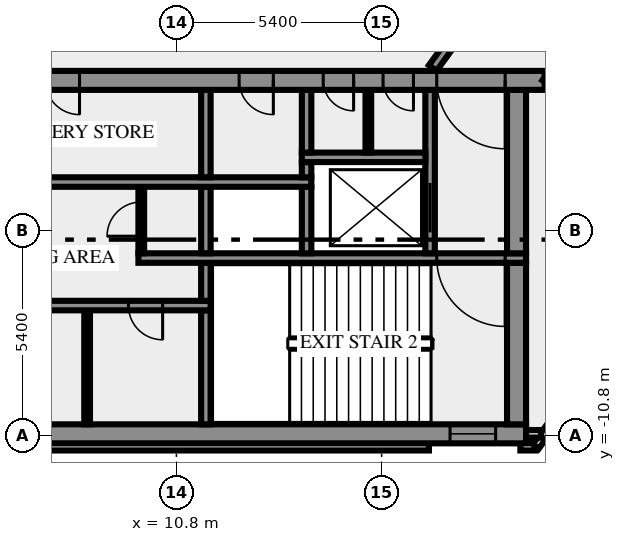
"""IFC4 building model, lengths in metres.
Left out: names, types, materials, properties, quantities, classifications, styles, units other than length and angle.
Written with IfcOpenShell. Run it as: python <this file> out.ifc"""

import sys

from ifc_helpers import new_model, si_unit, direction, frame, frame_2d, origin, place, context, subcontext, project, spatial, rectangle, extrude, element, fill, save


model = new_model("IFC4")
c1 = context("Model", 3, precision=1e-05, world=origin(), true_north=direction((0.0, 1.0)))
c2 = subcontext(c1, "Body", "Model", "MODEL_VIEW")
j1 = project(units=[si_unit("LENGTHUNIT", "METRE"), si_unit("PLANEANGLEUNIT", "RADIAN")], contexts=[c1])
p1 = place(None, origin())
s1 = spatial("IfcSite", under=j1, at=p1, CompositionType="ELEMENT")
p2 = place(p1, origin())
s2 = spatial("IfcBuilding", under=s1, at=p2, CompositionType="ELEMENT")
p3 = place(p2, frame((0.0, 0.0, 307.0)))
s3 = spatial("IfcBuildingStorey", under=s2, at=p3, CompositionType="ELEMENT", Elevation=307.0)
p4 = place(p3, frame((-17.444, -11.088, 0.0), z_axis=(0.0, 0.0, 1.0), x_axis=(1.0, 0.0, 0.0)))
e1 = element("IfcWall", 1, at=p4, inside=s3, PredefinedType="SOLIDWALL", context=c2, shape_type="SweptSolid", body=[
    extrude(rectangle(XDim=34.888, YDim=0.2, at=frame_2d((17.444, 0.0))), origin(), (0.0, 0.0, 1.0), 3.65),
])
p5 = place(p3, frame((19.85, -11.088, 0.0), z_axis=(0.0, 0.0, 1.0), x_axis=(1.0, 0.0, 0.0)))
e2 = element("IfcWall", 2, at=p5, inside=s3, PredefinedType="SOLIDWALL", context=c2, shape_type="SweptSolid", body=[
    extrude(rectangle(XDim=0.406, YDim=0.2, at=frame_2d((0.203, 0.0))), origin(), (0.0, 0.0, 1.0), 3.65),
])
p6 = place(p3, frame((20.253, -11.083, 0.0), z_axis=(0.0, 0.0, 1.0), x_axis=(0.587766567315, 0.809030569476, 0.0)))
e3 = element("IfcWall", 3, at=p6, inside=s3, PredefinedType="SOLIDWALL", context=c2, shape_type="SweptSolid", body=[
    extrude(rectangle(XDim=2.688, YDim=0.2, at=frame_2d((1.344, 0.0))), origin(), (0.0, 0.0, 1.0), 3.65),
])
p7 = place(p3, frame((19.98, -10.75, 0.0), z_axis=(0.0, 0.0, 1.0), x_axis=(1.0, 0.0, 0.0)))
e4 = element("IfcWall", 4, at=p7, inside=s3, PredefinedType="SOLIDWALL", context=c2, shape_type="SweptSolid", body=[
    extrude(rectangle(XDim=0.417, YDim=0.2, at=frame_2d((0.208, 0.0))), origin(), (0.0, 0.0, 1.0), 3.65),
])
p8 = place(p3, frame((-20.0, -10.75, 0.0), z_axis=(0.0, 0.0, 1.0), x_axis=(1.0, 0.0, 0.0)))
e5 = element("IfcWall", 5, at=p8, inside=s3, PredefinedType="SHEAR", context=c2, shape_type="SweptSolid", body=[
    extrude(rectangle(XDim=40.0, YDim=0.5, at=frame_2d((20.0, 0.0))), origin(), (0.0, 0.0, 1.0), 3.65),
])
p9 = place(p8, frame((0.8, 0.0, 1.0)))
e6 = element("IfcOpeningElement", 6, at=p9, cuts=e5, PredefinedType="OPENING", context=c2, shape_type="SweptSolid", body=[
    extrude(rectangle(XDim=1.2, YDim=1.2, at=frame_2d((0.6, 0.6))), frame((0.0, 0.26, 0.0), z_axis=(0.0, -1.0, 0.0), x_axis=(1.0, 0.0, 0.0)), (0.0, 0.0, 1.0), 0.52),
])
p10 = place(p8, frame((38.0, 0.0, 1.0)))
e7 = element("IfcOpeningElement", 7, at=p10, cuts=e5, PredefinedType="OPENING", context=c2, shape_type="SweptSolid", body=[
    extrude(rectangle(XDim=1.2, YDim=1.2, at=frame_2d((0.6, 0.6))), frame((0.0, 0.26, 0.0), z_axis=(0.0, -1.0, 0.0), x_axis=(1.0, 0.0, 0.0)), (0.0, 0.0, 1.0), 0.52),
])
p11 = place(p3, frame((8.45, -10.5, 0.0), z_axis=(0.0, 0.0, 1.0), x_axis=(0.0, 1.0, 0.0)))
e8 = element("IfcWall", 8, at=p11, inside=s3, PredefinedType="PARTITIONING", context=c2, shape_type="SweptSolid", body=[
    extrude(rectangle(XDim=3.0, YDim=0.15, at=frame_2d((1.5, 0.0))), origin(), (0.0, 0.0, 1.0), 3.65),
])
p12 = place(p3, frame((11.575, -10.5, 0.0), z_axis=(0.0, 0.0, 1.0), x_axis=(0.0, 1.0, 0.0)))
e9 = element("IfcWall", 9, at=p12, inside=s3, PredefinedType="SHEAR", context=c2, shape_type="SweptSolid", body=[
    extrude(rectangle(XDim=3.0, YDim=0.25, at=frame_2d((1.5, 0.0))), origin(), (0.0, 0.0, 1.0), 3.65),
])
p13 = place(p3, frame((19.75, -10.5, 0.0), z_axis=(0.0, 0.0, 1.0), x_axis=(0.0, 1.0, 0.0)))
e10 = element("IfcWall", 10, at=p13, inside=s3, PredefinedType="SHEAR", context=c2, shape_type="SweptSolid", body=[
    extrude(rectangle(XDim=4.25, YDim=0.5, at=frame_2d((2.125, 0.0))), origin(), (0.0, 0.0, 1.0), 3.65),
])
p14 = place(p3, frame((11.7, -7.375, 0.0), z_axis=(0.0, 0.0, 1.0), x_axis=(-1.0, 0.0, 0.0)))
e11 = element("IfcWall", 11, at=p14, inside=s3, PredefinedType="SHEAR", context=c2, shape_type="SweptSolid", body=[
    extrude(rectangle(XDim=23.4, YDim=0.25, at=frame_2d((11.7, 0.0))), origin(), (0.0, 0.0, 1.0), 3.65),
])
p15 = place(p14, frame((22.225, 0.0, 0.0)))
e12 = element("IfcOpeningElement", 12, at=p15, cuts=e11, PredefinedType="OPENING", context=c2, shape_type="SweptSolid", body=[
    extrude(rectangle(XDim=0.8, YDim=2.1, at=frame_2d((0.4, 1.05))), frame((0.0, 0.135, 0.0), z_axis=(0.0, -1.0, 0.0), x_axis=(1.0, 0.0, 0.0)), (0.0, 0.0, 1.0), 0.27),
])
p16 = place(p14, frame((20.2, 0.0, 0.0)))
e13 = element("IfcOpeningElement", 13, at=p16, cuts=e11, PredefinedType="OPENING", context=c2, shape_type="SweptSolid", body=[
    extrude(rectangle(XDim=1.1, YDim=2.1, at=frame_2d((0.55, 1.05))), frame((0.0, 0.135, 0.0), z_axis=(0.0, -1.0, 0.0), x_axis=(1.0, 0.0, 0.0)), (0.0, 0.0, 1.0), 0.27),
])
p17 = place(p14, frame((17.7, 0.0, 0.0)))
e14 = element("IfcOpeningElement", 14, at=p17, cuts=e11, PredefinedType="OPENING", context=c2, shape_type="SweptSolid", body=[
    extrude(rectangle(XDim=1.1, YDim=2.1, at=frame_2d((0.55, 1.05))), frame((0.0, 0.135, 0.0), z_axis=(0.0, -1.0, 0.0), x_axis=(1.0, 0.0, 0.0)), (0.0, 0.0, 1.0), 0.27),
])
p18 = place(p14, frame((15.975, 0.0, 0.0)))
e15 = element("IfcOpeningElement", 15, at=p18, cuts=e11, PredefinedType="OPENING", context=c2, shape_type="SweptSolid", body=[
    extrude(rectangle(XDim=0.8, YDim=2.1, at=frame_2d((0.4, 1.05))), frame((0.0, 0.135, 0.0), z_axis=(0.0, -1.0, 0.0), x_axis=(1.0, 0.0, 0.0)), (0.0, 0.0, 1.0), 0.27),
])
p19 = place(p14, frame((14.65, 0.0, 0.0)))
e16 = element("IfcOpeningElement", 16, at=p19, cuts=e11, PredefinedType="OPENING", context=c2, shape_type="SweptSolid", body=[
    extrude(rectangle(XDim=0.8, YDim=2.1, at=frame_2d((0.4, 1.05))), frame((0.0, 0.135, 0.0), z_axis=(0.0, -1.0, 0.0), x_axis=(1.0, 0.0, 0.0)), (0.0, 0.0, 1.0), 0.27),
])
p20 = place(p14, frame((12.8, 0.0, 0.0)))
e17 = element("IfcOpeningElement", 17, at=p20, cuts=e11, PredefinedType="OPENING", context=c2, shape_type="SweptSolid", body=[
    extrude(rectangle(XDim=0.9, YDim=2.1, at=frame_2d((0.45, 1.05))), frame((0.0, 0.135, 0.0), z_axis=(0.0, -1.0, 0.0), x_axis=(1.0, 0.0, 0.0)), (0.0, 0.0, 1.0), 0.27),
])
p21 = place(p14, frame((10.7, 0.0, 0.0)))
e18 = element("IfcOpeningElement", 18, at=p21, cuts=e11, PredefinedType="OPENING", context=c2, shape_type="SweptSolid", body=[
    extrude(rectangle(XDim=0.9, YDim=2.1, at=frame_2d((0.45, 1.05))), frame((0.0, 0.135, 0.0), z_axis=(0.0, -1.0, 0.0), x_axis=(1.0, 0.0, 0.0)), (0.0, 0.0, 1.0), 0.27),
])
p22 = place(p14, frame((6.237, 0.0, 0.0)))
e19 = element("IfcOpeningElement", 19, at=p22, cuts=e11, PredefinedType="OPENING", context=c2, shape_type="SweptSolid", body=[
    extrude(rectangle(XDim=0.9, YDim=2.1, at=frame_2d((0.45, 1.05))), frame((0.0, 0.135, 0.0), z_axis=(0.0, -1.0, 0.0), x_axis=(1.0, 0.0, 0.0)), (0.0, 0.0, 1.0), 0.27),
])
p23 = place(p14, frame((1.263, 0.0, 0.0)))
e20 = element("IfcOpeningElement", 20, at=p23, cuts=e11, PredefinedType="OPENING", context=c2, shape_type="SweptSolid", body=[
    extrude(rectangle(XDim=0.9, YDim=2.1, at=frame_2d((0.45, 1.05))), frame((0.0, 0.135, 0.0), z_axis=(0.0, -1.0, 0.0), x_axis=(1.0, 0.0, 0.0)), (0.0, 0.0, 1.0), 0.27),
])
p24 = place(p3, frame((11.575, -7.25, 0.0), z_axis=(0.0, 0.0, 1.0), x_axis=(0.0, 1.0, 0.0)))
e21 = element("IfcWall", 21, at=p24, inside=s3, PredefinedType="SHEAR", context=c2, shape_type="SweptSolid", body=[
    extrude(rectangle(XDim=1.0, YDim=0.25, at=frame_2d((0.5, 0.0))), origin(), (0.0, 0.0, 1.0), 3.65),
])
p25 = place(p3, frame((20.0, -6.125, 0.0), z_axis=(0.0, 0.0, 1.0), x_axis=(-1.0, 0.0, 0.0)))
e22 = element("IfcWall", 22, at=p25, inside=s3, PredefinedType="SHEAR", context=c2, shape_type="SweptSolid", body=[
    extrude(rectangle(XDim=10.2, YDim=0.25, at=frame_2d((5.1, 0.0))), origin(), (0.0, 0.0, 1.0), 3.65),
])
p26 = place(p25, frame((0.55, 0.0, 0.0)))
e23 = element("IfcOpeningElement", 23, at=p26, cuts=e22, PredefinedType="OPENING", context=c2, shape_type="SweptSolid", body=[
    extrude(rectangle(XDim=1.8, YDim=2.1, at=frame_2d((0.9, 1.05))), frame((0.0, 0.135, 0.0), z_axis=(0.0, -1.0, 0.0), x_axis=(1.0, 0.0, 0.0)), (0.0, 0.0, 1.0), 0.27),
])
p27 = place(p3, frame((9.875, -6.0, 0.0), z_axis=(0.0, 0.0, 1.0), x_axis=(0.0, 1.0, 0.0)))
e24 = element("IfcWall", 24, at=p27, inside=s3, PredefinedType="PARTITIONING", context=c2, shape_type="SweptSolid", body=[
    extrude(rectangle(XDim=1.75, YDim=0.15, at=frame_2d((0.875, 0.0))), origin(), (0.0, 0.0, 1.0), 3.65),
])
p28 = place(p27, frame((0.45, 0.0, 0.0)))
e25 = element("IfcOpeningElement", 25, at=p28, cuts=e24, PredefinedType="OPENING", context=c2, shape_type="SweptSolid", body=[
    extrude(rectangle(XDim=0.9, YDim=2.1, at=frame_2d((0.45, 1.05))), frame((0.0, 0.085, 0.0), z_axis=(0.0, -1.0, 0.0), x_axis=(1.0, 0.0, 0.0)), (0.0, 0.0, 1.0), 0.17),
])
for number, where, z_axis, x_axis in (
    (26, (11.575, -6.0, 0.0), (0.0, 0.0, 1.0), (0.0, 1.0, 0.0)),
    (27, (14.225, -6.0, 0.0), (0.0, 0.0, 1.0), (0.0, 1.0, 0.0)),
):
    element("IfcWall", number, at=place(p3, frame(where, z_axis=z_axis, x_axis=x_axis)), inside=s3, PredefinedType="SHEAR", context=c2, shape_type="SweptSolid", body=[
        extrude(rectangle(XDim=1.75, YDim=0.25, at=frame_2d((0.875, 0.0))), origin(), (0.0, 0.0, 1.0), 3.65),
    ])
p29 = place(p3, frame((17.475, -6.0, 0.0), z_axis=(0.0, 0.0, 1.0), x_axis=(0.0, 1.0, 0.0)))
e28 = element("IfcWall", 28, at=p29, inside=s3, PredefinedType="SHEAR", context=c2, shape_type="SweptSolid", body=[
    extrude(rectangle(XDim=4.3, YDim=0.25, at=frame_2d((2.15, 0.0))), origin(), (0.0, 0.0, 1.0), 3.65),
])
p30 = place(p29, frame((0.55, 0.0, 0.0)))
e29 = element("IfcOpeningElement", 29, at=p30, cuts=e28, PredefinedType="OPENING", context=c2, shape_type="SweptSolid", body=[
    extrude(rectangle(XDim=1.3, YDim=2.1, at=frame_2d((0.65, 1.05))), frame((0.0, 0.135, 0.0), z_axis=(0.0, -1.0, 0.0), x_axis=(1.0, 0.0, 0.0)), (0.0, 0.0, 1.0), 0.27),
])
p31 = place(p3, frame((19.75, -6.0, 0.0), z_axis=(0.0, 0.0, 1.0), x_axis=(0.0, 1.0, 0.0)))
e30 = element("IfcWall", 30, at=p31, inside=s3, PredefinedType="SHEAR", context=c2, shape_type="SweptSolid", body=[
    extrude(rectangle(XDim=4.3, YDim=0.5, at=frame_2d((2.15, 0.0))), origin(), (0.0, 0.0, 1.0), 3.65),
])
p32 = place(p3, frame((-0.6, -4.125, 0.0), z_axis=(0.0, 0.0, 1.0), x_axis=(1.0, 0.0, 0.0)))
e31 = element("IfcWall", 31, at=p32, inside=s3, PredefinedType="SHEAR", context=c2, shape_type="SweptSolid", body=[
    extrude(rectangle(XDim=14.95, YDim=0.25, at=frame_2d((7.475, 0.0))), origin(), (0.0, 0.0, 1.0), 3.65),
])
p33 = place(p32, frame((2.75, 0.0, 0.0)))
e32 = element("IfcOpeningElement", 32, at=p33, cuts=e31, PredefinedType="OPENING", context=c2, shape_type="SweptSolid", body=[
    extrude(rectangle(XDim=1.3, YDim=2.1, at=frame_2d((0.65, 1.05))), frame((0.0, 0.135, 0.0), z_axis=(0.0, -1.0, 0.0), x_axis=(1.0, 0.0, 0.0)), (0.0, 0.0, 1.0), 0.27),
])
p34 = place(p3, frame((11.575, -4.0, 0.0), z_axis=(0.0, 0.0, 1.0), x_axis=(0.0, 1.0, 0.0)))
e33 = element("IfcWall", 33, at=p34, inside=s3, PredefinedType="SHEAR", context=c2, shape_type="SweptSolid", body=[
    extrude(rectangle(XDim=2.3, YDim=0.25, at=frame_2d((1.15, 0.0))), origin(), (0.0, 0.0, 1.0), 3.65),
])
p35 = place(p3, frame((14.225, -4.0, 0.0), z_axis=(0.0, 0.0, 1.0), x_axis=(0.0, 1.0, 0.0)))
e34 = element("IfcWall", 34, at=p35, inside=s3, PredefinedType="SHEAR", context=c2, shape_type="SweptSolid", body=[
    extrude(rectangle(XDim=0.4, YDim=0.25, at=frame_2d((0.2, 0.0))), origin(), (0.0, 0.0, 1.0), 3.65),
])
p36 = place(p3, frame((14.1, -3.475, 0.0), z_axis=(0.0, 0.0, 1.0), x_axis=(1.0, 0.0, 0.0)))
e35 = element("IfcWall", 35, at=p36, inside=s3, PredefinedType="SHEAR", context=c2, shape_type="SweptSolid", body=[
    extrude(rectangle(XDim=3.25, YDim=0.25, at=frame_2d((1.625, 0.0))), origin(), (0.0, 0.0, 1.0), 3.65),
])
p37 = place(p3, frame((14.225, -3.35, 0.0), z_axis=(0.0, 0.0, 1.0), x_axis=(0.0, 1.0, 0.0)))
e36 = element("IfcWall", 36, at=p37, inside=s3, PredefinedType="SHEAR", context=c2, shape_type="SweptSolid", body=[
    extrude(rectangle(XDim=1.65, YDim=0.25, at=frame_2d((0.825, 0.0))), origin(), (0.0, 0.0, 1.0), 3.65),
])
p38 = place(p3, frame((15.85, -3.35, 0.0), z_axis=(0.0, 0.0, 1.0), x_axis=(0.0, 1.0, 0.0)))
e37 = element("IfcWall", 37, at=p38, inside=s3, PredefinedType="PARTITIONING", context=c2, shape_type="SweptSolid", body=[
    extrude(rectangle(XDim=1.65, YDim=0.15, at=frame_2d((0.825, 0.0))), origin(), (0.0, 0.0, 1.0), 3.65),
])
p39 = place(p3, frame((20.49, -1.45, 0.0), z_axis=(0.0, 0.0, 1.0), x_axis=(-1.0, 0.0, 0.0)))
e38 = element("IfcWall", 38, at=p39, inside=s3, PredefinedType="SHEAR", context=c2, shape_type="SweptSolid", body=[
    extrude(rectangle(XDim=40.98, YDim=0.5, at=frame_2d((20.49, 0.0))), origin(), (0.0, 0.0, 1.0), 3.65),
])
p40 = place(p39, frame((38.14, 0.0, 0.0)))
e39 = element("IfcOpeningElement", 39, at=p40, cuts=e38, PredefinedType="OPENING", context=c2, shape_type="SweptSolid", body=[
    extrude(rectangle(XDim=1.8, YDim=2.1, at=frame_2d((0.9, 1.05))), frame((0.0, 0.26, 0.0), z_axis=(0.0, -1.0, 0.0), x_axis=(1.0, 0.0, 0.0)), (0.0, 0.0, 1.0), 0.52),
])
p41 = place(p39, frame((35.89, 0.0, 0.0)))
e40 = element("IfcOpeningElement", 40, at=p41, cuts=e38, PredefinedType="OPENING", context=c2, shape_type="SweptSolid", body=[
    extrude(rectangle(XDim=0.9, YDim=2.1, at=frame_2d((0.45, 1.05))), frame((0.0, 0.26, 0.0), z_axis=(0.0, -1.0, 0.0), x_axis=(1.0, 0.0, 0.0)), (0.0, 0.0, 1.0), 0.52),
])
p42 = place(p39, frame((32.94, 0.0, 0.0)))
e41 = element("IfcOpeningElement", 41, at=p42, cuts=e38, PredefinedType="OPENING", context=c2, shape_type="SweptSolid", body=[
    extrude(rectangle(XDim=0.9, YDim=2.1, at=frame_2d((0.45, 1.05))), frame((0.0, 0.26, 0.0), z_axis=(0.0, -1.0, 0.0), x_axis=(1.0, 0.0, 0.0)), (0.0, 0.0, 1.0), 0.52),
])
p43 = place(p39, frame((31.015, 0.0, 0.0)))
e42 = element("IfcOpeningElement", 42, at=p43, cuts=e38, PredefinedType="OPENING", context=c2, shape_type="SweptSolid", body=[
    extrude(rectangle(XDim=0.8, YDim=2.1, at=frame_2d((0.4, 1.05))), frame((0.0, 0.26, 0.0), z_axis=(0.0, -1.0, 0.0), x_axis=(1.0, 0.0, 0.0)), (0.0, 0.0, 1.0), 0.52),
])
p44 = place(p39, frame((24.765, 0.0, 0.0)))
e43 = element("IfcOpeningElement", 43, at=p44, cuts=e38, PredefinedType="OPENING", context=c2, shape_type="SweptSolid", body=[
    extrude(rectangle(XDim=0.8, YDim=2.1, at=frame_2d((0.4, 1.05))), frame((0.0, 0.26, 0.0), z_axis=(0.0, -1.0, 0.0), x_axis=(1.0, 0.0, 0.0)), (0.0, 0.0, 1.0), 0.52),
])
p45 = place(p39, frame((21.765, 0.0, 0.0)))
e44 = element("IfcOpeningElement", 44, at=p45, cuts=e38, PredefinedType="OPENING", context=c2, shape_type="SweptSolid", body=[
    extrude(rectangle(XDim=2.0, YDim=2.1, at=frame_2d((1.0, 1.05))), frame((0.0, 0.26, 0.0), z_axis=(0.0, -1.0, 0.0), x_axis=(1.0, 0.0, 0.0)), (0.0, 0.0, 1.0), 0.52),
])
p46 = place(p39, frame((12.24, 0.0, 0.0)))
e45 = element("IfcOpeningElement", 45, at=p46, cuts=e38, PredefinedType="OPENING", context=c2, shape_type="SweptSolid", body=[
    extrude(rectangle(XDim=0.9, YDim=2.1, at=frame_2d((0.45, 1.05))), frame((0.0, 0.26, 0.0), z_axis=(0.0, -1.0, 0.0), x_axis=(1.0, 0.0, 0.0)), (0.0, 0.0, 1.0), 0.52),
])
p47 = place(p39, frame((7.14, 0.0, 0.0)))
e46 = element("IfcOpeningElement", 46, at=p47, cuts=e38, PredefinedType="OPENING", context=c2, shape_type="SweptSolid", body=[
    extrude(rectangle(XDim=0.9, YDim=2.1, at=frame_2d((0.45, 1.05))), frame((0.0, 0.26, 0.0), z_axis=(0.0, -1.0, 0.0), x_axis=(1.0, 0.0, 0.0)), (0.0, 0.0, 1.0), 0.52),
])
p48 = place(p39, frame((5.028, 0.0, 0.0)))
e47 = element("IfcOpeningElement", 47, at=p48, cuts=e38, PredefinedType="OPENING", context=c2, shape_type="SweptSolid", body=[
    extrude(rectangle(XDim=0.8, YDim=2.1, at=frame_2d((0.4, 1.05))), frame((0.0, 0.26, 0.0), z_axis=(0.0, -1.0, 0.0), x_axis=(1.0, 0.0, 0.0)), (0.0, 0.0, 1.0), 0.52),
])
p49 = place(p39, frame((3.452, 0.0, 0.0)))
e48 = element("IfcOpeningElement", 48, at=p49, cuts=e38, PredefinedType="OPENING", context=c2, shape_type="SweptSolid", body=[
    extrude(rectangle(XDim=0.8, YDim=2.1, at=frame_2d((0.4, 1.05))), frame((0.0, 0.26, 0.0), z_axis=(0.0, -1.0, 0.0), x_axis=(1.0, 0.0, 0.0)), (0.0, 0.0, 1.0), 0.52),
])
p50 = place(p39, frame((1.04, 0.0, 0.0)))
e49 = element("IfcOpeningElement", 49, at=p50, cuts=e38, PredefinedType="OPENING", context=c2, shape_type="SweptSolid", body=[
    extrude(rectangle(XDim=1.8, YDim=2.1, at=frame_2d((0.9, 1.05))), frame((0.0, 0.26, 0.0), z_axis=(0.0, -1.0, 0.0), x_axis=(1.0, 0.0, 0.0)), (0.0, 0.0, 1.0), 0.52),
])
p51 = place(p3, frame((17.545, -1.125, 0.0), z_axis=(0.0, 0.0, 1.0), x_axis=(0.587796810203, 0.809008596935, 0.0)))
e50 = element("IfcWall", 50, at=p51, inside=s3, PredefinedType="SOLIDWALL", context=c2, shape_type="SweptSolid", body=[
    extrude(rectangle(XDim=12.703, YDim=0.25, at=frame_2d((6.352, 0.0))), origin(), (0.0, 0.0, 1.0), 3.65),
])
p52 = place(p51, frame((11.329, 0.0, 0.0)))
e51 = element("IfcOpeningElement", 51, at=p52, cuts=e50, PredefinedType="OPENING", context=c2, shape_type="SweptSolid", body=[
    extrude(rectangle(XDim=0.9, YDim=2.1, at=frame_2d((0.45, 1.05))), frame((0.0, 0.135, 0.0), z_axis=(0.0, -1.0, 0.0), x_axis=(1.0, 0.0, 0.0)), (0.0, 0.0, 1.0), 0.27),
])
p53 = place(p3, frame((27.009, 7.392, 0.0), z_axis=(0.0, 0.0, 1.0), x_axis=(-0.587776457057, -0.809023384414, 0.0)))
e52 = element("IfcWall", 52, at=p53, inside=s3, PredefinedType="SOLIDWALL", context=c2, shape_type="SweptSolid", body=[
    extrude(rectangle(XDim=11.021, YDim=0.25, at=frame_2d((5.51, 0.0))), origin(), (0.0, 0.0, 1.0), 3.65),
])
p54 = place(p53, frame((9.588, 0.0, 0.0)))
e53 = element("IfcOpeningElement", 53, at=p54, cuts=e52, PredefinedType="OPENING", context=c2, shape_type="SweptSolid", body=[
    extrude(rectangle(XDim=0.9, YDim=2.1, at=frame_2d((0.45, 1.05))), frame((0.0, 0.135, 0.0), z_axis=(0.0, -1.0, 0.0), x_axis=(1.0, 0.0, 0.0)), (0.0, 0.0, 1.0), 0.27),
])
p55 = place(p10, origin())
e54 = element("IfcWindow", 54, at=p55, inside=s3, PartitioningType="SINGLE_PANEL", PredefinedType="WINDOW", context=c2, shape_type="SweptSolid", body=[
    extrude(rectangle(XDim=1.2, YDim=1.2, at=frame_2d((0.6, 0.6))), frame((0.0, 0.03, 0.0), z_axis=(0.0, -1.0, 0.0), x_axis=(1.0, 0.0, 0.0)), (0.0, 0.0, 1.0), 0.06),
])
fill(e7, e54)
p56 = place(p23, origin())
e55 = element("IfcDoor", 55, at=p56, inside=s3, OperationType="SINGLE_SWING_LEFT", PredefinedType="DOOR", context=c2, shape_type="SweptSolid", body=[
    extrude(rectangle(XDim=0.9, YDim=2.1, at=frame_2d((0.45, 1.05))), frame((0.0, 0.025, 0.0), z_axis=(0.0, -1.0, 0.0), x_axis=(1.0, 0.0, 0.0)), (0.0, 0.0, 1.0), 0.05),
])
fill(e20, e55)
p57 = place(p26, origin())
e56 = element("IfcDoor", 56, at=p57, inside=s3, OperationType="DOUBLE_DOOR_SINGLE_SWING", PredefinedType="DOOR", context=c2, shape_type="SweptSolid", body=[
    extrude(rectangle(XDim=1.8, YDim=2.1, at=frame_2d((0.9, 1.05))), frame((0.0, 0.025, 0.0), z_axis=(0.0, -1.0, 0.0), x_axis=(1.0, 0.0, 0.0)), (0.0, 0.0, 1.0), 0.05),
])
fill(e23, e56)
p58 = place(p28, origin())
e57 = element("IfcDoor", 57, at=p58, inside=s3, OperationType="SINGLE_SWING_RIGHT", PredefinedType="DOOR", context=c2, shape_type="SweptSolid", body=[
    extrude(rectangle(XDim=0.9, YDim=2.1, at=frame_2d((0.45, 1.05))), frame((0.0, 0.025, 0.0), z_axis=(0.0, -1.0, 0.0), x_axis=(1.0, 0.0, 0.0)), (0.0, 0.0, 1.0), 0.05),
])
fill(e25, e57)
p59 = place(p30, origin())
e58 = element("IfcDoor", 58, at=p59, inside=s3, OperationType="DOUBLE_DOOR_SLIDING", PredefinedType="DOOR", context=c2, shape_type="SweptSolid", body=[
    extrude(rectangle(XDim=1.3, YDim=2.1, at=frame_2d((0.65, 1.05))), frame((0.0, 0.025, 0.0), z_axis=(0.0, -1.0, 0.0), x_axis=(1.0, 0.0, 0.0)), (0.0, 0.0, 1.0), 0.05),
])
fill(e29, e58)
p60 = place(p46, origin())
e59 = element("IfcDoor", 59, at=p60, inside=s3, OperationType="SINGLE_SWING_LEFT", PredefinedType="DOOR", context=c2, shape_type="SweptSolid", body=[
    extrude(rectangle(XDim=0.9, YDim=2.1, at=frame_2d((0.45, 1.05))), frame((0.0, 0.025, 0.0), z_axis=(0.0, -1.0, 0.0), x_axis=(1.0, 0.0, 0.0)), (0.0, 0.0, 1.0), 0.05),
])
fill(e45, e59)
p61 = place(p47, origin())
e60 = element("IfcDoor", 60, at=p61, inside=s3, OperationType="SINGLE_SWING_LEFT", PredefinedType="DOOR", context=c2, shape_type="SweptSolid", body=[
    extrude(rectangle(XDim=0.9, YDim=2.1, at=frame_2d((0.45, 1.05))), frame((0.0, 0.025, 0.0), z_axis=(0.0, -1.0, 0.0), x_axis=(1.0, 0.0, 0.0)), (0.0, 0.0, 1.0), 0.05),
])
fill(e46, e60)
p62 = place(p48, origin())
e61 = element("IfcDoor", 61, at=p62, inside=s3, OperationType="SINGLE_SWING_LEFT", PredefinedType="DOOR", context=c2, shape_type="SweptSolid", body=[
    extrude(rectangle(XDim=0.8, YDim=2.1, at=frame_2d((0.4, 1.05))), frame((0.0, 0.025, 0.0), z_axis=(0.0, -1.0, 0.0), x_axis=(1.0, 0.0, 0.0)), (0.0, 0.0, 1.0), 0.05),
])
fill(e47, e61)
p63 = place(p49, origin())
e62 = element("IfcDoor", 62, at=p63, inside=s3, OperationType="SINGLE_SWING_LEFT", PredefinedType="DOOR", context=c2, shape_type="SweptSolid", body=[
    extrude(rectangle(XDim=0.8, YDim=2.1, at=frame_2d((0.4, 1.05))), frame((0.0, 0.025, 0.0), z_axis=(0.0, -1.0, 0.0), x_axis=(1.0, 0.0, 0.0)), (0.0, 0.0, 1.0), 0.05),
])
fill(e48, e62)
p64 = place(p50, origin())
e63 = element("IfcDoor", 63, at=p64, inside=s3, OperationType="DOUBLE_DOOR_SINGLE_SWING", PredefinedType="DOOR", context=c2, shape_type="SweptSolid", body=[
    extrude(rectangle(XDim=1.8, YDim=2.1, at=frame_2d((0.9, 1.05))), frame((0.0, 0.025, 0.0), z_axis=(0.0, -1.0, 0.0), x_axis=(1.0, 0.0, 0.0)), (0.0, 0.0, 1.0), 0.05),
])
fill(e49, e63)
save(model, sys.argv[1])
